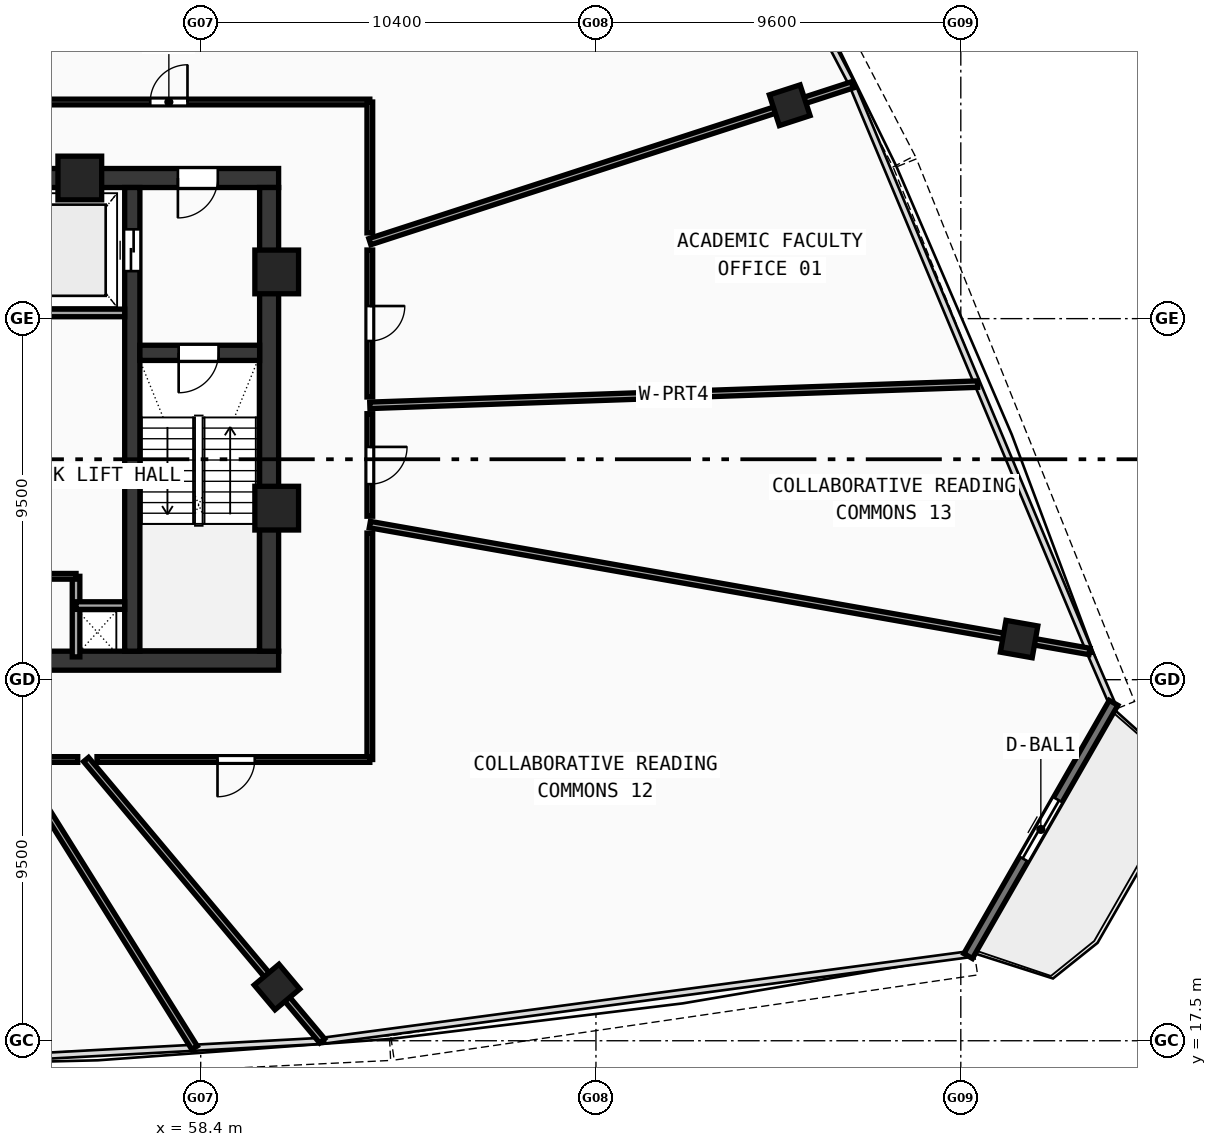
"""IFC4 building model, lengths in metres.
Left out: names, types, materials, properties, quantities, classifications, styles, units other than length and angle.
Written with IfcOpenShell. Run it as: python <this file> out.ifc"""

import sys

from ifc_helpers import new_model, si_unit, direction, frame, frame_2d, origin, origin_with_axes, origin_2d, place, context, subcontext, project, spatial, rectangle, hollow_rectangle, extrude, source, transform, mapped, element, fill, save


model = new_model("IFC4")
c1 = context("Model", 3, precision=1e-05, world=origin(), true_north=direction((0.0, 1.0)))
c2 = subcontext(c1, "Body", "Model", "MODEL_VIEW")
j1 = project(units=[si_unit("LENGTHUNIT", "METRE"), si_unit("PLANEANGLEUNIT", "RADIAN")], contexts=[c1])
p1 = place(None, origin())
s1 = spatial("IfcSite", under=j1, at=p1, CompositionType="ELEMENT")
p2 = place(p1, origin())
s2 = spatial("IfcBuilding", under=s1, at=p2, CompositionType="ELEMENT")
p3 = place(p2, frame((0.0, 0.0, 259.45)))
s3 = spatial("IfcBuildingStorey", under=s2, at=p3, CompositionType="ELEMENT", Elevation=259.45)
p4 = place(p3, frame((35.55, 27.5, 0.0), z_axis=(0.0, 0.0, 1.0), x_axis=(1.0, 0.0, 0.0)))
e1 = element("IfcWall", 1, at=p4, inside=s3, PredefinedType="SHEAR", context=c2, shape_type="SweptSolid", body=[
    extrude(rectangle(XDim=24.9, YDim=0.5, at=frame_2d((12.45, 0.0))), origin(), (0.0, 0.0, 1.0), 3.47),
])
p5 = place(p3, frame((49.2, 40.2, 0.0), z_axis=(0.0, 0.0, 1.0), x_axis=(1.0, 0.0, 0.0)))
e2 = element("IfcWall", 2, at=p5, inside=s3, PredefinedType="SHEAR", context=c2, shape_type="SweptSolid", body=[
    extrude(rectangle(XDim=11.25, YDim=0.5, at=frame_2d((5.625, 0.0))), origin(), (0.0, 0.0, 1.0), 3.47),
])
p6 = place(p5, frame((8.6, 0.0, 0.0)))
e3 = element("IfcOpeningElement", 3, at=p6, cuts=e2, PredefinedType="OPENING", context=c2, shape_type="SweptSolid", body=[
    extrude(rectangle(XDim=1.05, YDim=2.1, at=frame_2d((0.525, 1.05))), frame((0.0, 0.26, 0.0), z_axis=(0.0, -1.0, 0.0), x_axis=(1.0, 0.0, 0.0)), (0.0, 0.0, 1.0), 0.52),
])
p7 = place(p3, frame((60.2, 27.75, 0.0), z_axis=(0.0, 0.0, 1.0), x_axis=(0.0, 1.0, 0.0)))
e4 = element("IfcWall", 4, at=p7, inside=s3, PredefinedType="SHEAR", context=c2, shape_type="SweptSolid", body=[
    extrude(rectangle(XDim=12.2, YDim=0.5, at=frame_2d((6.1, 0.0))), origin(), (0.0, 0.0, 1.0), 3.47),
])
p8 = place(p3, frame((56.6, 27.75, 0.0), z_axis=(0.0, 0.0, 1.0), x_axis=(0.0, 1.0, 0.0)))
e5 = element("IfcWall", 5, at=p8, inside=s3, PredefinedType="SHEAR", context=c2, shape_type="SweptSolid", body=[
    extrude(rectangle(XDim=12.2, YDim=0.4, at=frame_2d((6.1, 0.0))), origin(), (0.0, 0.0, 1.0), 3.47),
])
p9 = place(p8, frame((10.0, 0.0, 0.0)))
e6 = element("IfcOpeningElement", 6, at=p9, cuts=e5, PredefinedType="OPENING", context=c2, shape_type="SweptSolid", body=[
    extrude(rectangle(XDim=1.1, YDim=2.1, at=frame_2d((0.55, 1.05))), frame((0.0, 0.21, 0.0), z_axis=(0.0, -1.0, 0.0), x_axis=(1.0, 0.0, 0.0)), (0.0, 0.0, 1.0), 0.42),
])
p10 = place(p3, frame((56.8, 35.6, 0.0), z_axis=(0.0, 0.0, 1.0), x_axis=(1.0, 0.0, 0.0)))
e7 = element("IfcWall", 7, at=p10, inside=s3, PredefinedType="SHEAR", context=c2, shape_type="SweptSolid", body=[
    extrude(rectangle(XDim=3.15, YDim=0.4, at=frame_2d((1.575, 0.0))), origin(), (0.0, 0.0, 1.0), 3.47),
])
p11 = place(p10, frame((1.02, 0.0, 0.0)))
e8 = element("IfcOpeningElement", 8, at=p11, cuts=e7, PredefinedType="OPENING", context=c2, shape_type="SweptSolid", body=[
    extrude(rectangle(XDim=1.05, YDim=2.1, at=frame_2d((0.525, 1.05))), frame((0.0, 0.21, 0.0), z_axis=(0.0, -1.0, 0.0), x_axis=(1.0, 0.0, 0.0)), (0.0, 0.0, 1.0), 0.42),
])
m1 = source(origin(), c2, "Body", "SweptSolid", [
    extrude(hollow_rectangle(XDim=1.15, YDim=1.15, WallThickness=0.048, at=origin_2d()), origin(), (0.0, 0.0, 1.0), 3.73),
])
for number, where, z_axis, x_axis in (
    (9, (60.4, 31.513, -0.26), (0.0, 0.0, 1.0), (1.0, 0.0, 0.0)),
    (10, (60.4, 37.729, -0.26), (0.0, 0.0, 1.0), (1.0, 0.0, 0.0)),
    (11, (55.219, 40.2, -0.26), (0.0, 0.0, 1.0), (1.0, 0.0, 0.0)),
):
    element("IfcColumn", number, at=place(p3, frame(where, z_axis=z_axis, x_axis=x_axis)), inside=s3, PredefinedType="COLUMN", context=c2, shape_type="MappedRepresentation", body=[
        mapped(m1, transform((0.0, 0.0, 0.0), scale=1.0)),
    ])
m2 = source(origin(), c2, "Body", "SweptSolid", [
    extrude(hollow_rectangle(XDim=0.85, YDim=0.85, WallThickness=0.034, at=origin_2d()), origin(), (0.0, 0.0, 1.0), 3.73),
])
for number, where, z_axis, x_axis in (
    (12, (60.407, 18.914, -0.26), (0.0, 0.0, 1.0), (0.766, 0.643, 0.0)),
    (13, (79.934, 28.069, -0.26), (0.0, 0.0, 1.0), (0.174, 0.985, 0.0)),
    (14, (73.899, 42.115, -0.26), (0.0, 0.0, 1.0), (-0.309, 0.951, 0.0)),
):
    element("IfcColumn", number, at=place(p3, frame(where, z_axis=z_axis, x_axis=x_axis)), inside=s3, PredefinedType="COLUMN", context=c2, shape_type="MappedRepresentation", body=[
        mapped(m2, transform((0.0, 0.0, 0.0), scale=1.0)),
    ])
p12 = place(p3, frame((78.593, 19.729, 0.0), z_axis=(0.0, 0.0, 1.0), x_axis=(0.497934343816, 0.867214730761, 0.0)))
e15 = element("IfcWall", 15, at=p12, inside=s3, PredefinedType="STANDARD", context=c2, shape_type="SweptSolid", body=[
    extrude(rectangle(XDim=7.684, YDim=0.26, at=frame_2d((3.842, 0.0))), origin(), (0.0, 0.0, 1.0), 3.47),
])
p13 = place(p12, frame((2.942, 0.0, 0.0)))
e16 = element("IfcOpeningElement", 16, at=p13, cuts=e15, PredefinedType="OPENING", context=c2, shape_type="SweptSolid", body=[
    extrude(rectangle(XDim=1.8, YDim=2.15, at=frame_2d((0.9, 1.075))), frame((0.0, 0.14, 0.0), z_axis=(0.0, -1.0, 0.0), x_axis=(1.0, 0.0, 0.0)), (0.0, 0.0, 1.0), 0.28),
])
p14 = place(p3, frame((53.68, 36.65, 0.0), z_axis=(0.0, 0.0, 1.0), x_axis=(1.0, 0.0, 0.0)))
e17 = element("IfcWall", 17, at=p14, inside=s3, PredefinedType="SOLIDWALL", context=c2, shape_type="SweptSolid", body=[
    extrude(rectangle(XDim=2.72, YDim=0.2, at=frame_2d((1.36, 0.0))), origin(), (0.0, 0.0, 1.0), 3.47),
])
p15 = place(p3, frame((55.12, 27.6, 0.0), z_axis=(0.0, 0.0, 1.0), x_axis=(0.0, 1.0, 0.0)))
e18 = element("IfcWall", 18, at=p15, inside=s3, PredefinedType="SOLIDWALL", context=c2, shape_type="SweptSolid", body=[
    extrude(rectangle(XDim=2.12, YDim=0.2, at=frame_2d((1.06, 0.0))), origin(), (0.0, 0.0, 1.0), 3.47),
])
p16 = place(p3, frame((55.12, 28.95, 0.0), z_axis=(0.0, 0.0, 1.0), x_axis=(1.0, 0.0, 0.0)))
e19 = element("IfcWall", 19, at=p16, inside=s3, PredefinedType="SOLIDWALL", context=c2, shape_type="SweptSolid", body=[
    extrude(rectangle(XDim=1.28, YDim=0.2, at=frame_2d((0.64, 0.0))), origin(), (0.0, 0.0, 1.0), 3.47),
])
p17 = place(p3, frame((51.05, 29.72, 0.0), z_axis=(0.0, 0.0, 1.0), x_axis=(1.0, 0.0, 0.0)))
e20 = element("IfcWall", 20, at=p17, inside=s3, PredefinedType="PARTITIONING", context=c2, shape_type="SweptSolid", body=[
    extrude(rectangle(XDim=4.07, YDim=0.15, at=frame_2d((2.035, 0.0))), origin(), (0.0, 0.0, 1.0), 3.47),
])
p18 = place(p17, frame((0.5, 0.0, 0.0)))
e21 = element("IfcOpeningElement", 21, at=p18, cuts=e20, PredefinedType="OPENING", context=c2, shape_type="SweptSolid", body=[
    extrude(rectangle(XDim=0.9, YDim=2.1, at=frame_2d((0.45, 1.05))), frame((0.0, 0.085, 0.0), z_axis=(0.0, -1.0, 0.0), x_axis=(1.0, 0.0, 0.0)), (0.0, 0.0, 1.0), 0.17),
])
p19 = place(p3, frame((62.85, 34.219, 0.0), z_axis=(0.0, 0.0, 1.0), x_axis=(0.99939049717, 0.034908941063, 0.0)))
e22 = element("IfcWall", 22, at=p19, inside=s3, PredefinedType="PARTITIONING", context=c2, shape_type="SweptSolid", body=[
    extrude(rectangle(XDim=16.001, YDim=0.17, at=frame_2d((8.001, 0.0))), origin(), (0.0, 0.0, 1.0), 2.82),
])
p20 = place(p3, frame((62.85, 38.525, 0.0), z_axis=(0.0, 0.0, 1.0), x_axis=(0.951055435747, 0.30902031994, 0.0)))
e23 = element("IfcWall", 23, at=p20, inside=s3, PredefinedType="PARTITIONING", context=c2, shape_type="SweptSolid", body=[
    extrude(rectangle(XDim=13.349, YDim=0.17, at=frame_2d((6.675, 0.0))), origin(), (0.0, 0.0, 1.0), 2.82),
])
p21 = place(p3, frame((51.784, 42.2, 0.0), z_axis=(0.0, 0.0, 1.0), x_axis=(0.406736188948, 0.913545659833, 0.0)))
e24 = element("IfcWall", 24, at=p21, inside=s3, PredefinedType="PARTITIONING", context=c2, shape_type="SweptSolid", body=[
    extrude(rectangle(XDim=25.501, YDim=0.17, at=frame_2d((12.75, 0.0))), origin(), (0.0, 0.0, 1.0), 2.82),
])
p22 = place(p3, frame((53.499, 24.9, 0.0), z_axis=(0.0, 0.0, 1.0), x_axis=(0.529920411872, -0.848047379031, 0.0)))
e25 = element("IfcWall", 25, at=p22, inside=s3, PredefinedType="PARTITIONING", context=c2, shape_type="SweptSolid", body=[
    extrude(rectangle(XDim=8.943, YDim=0.17, at=frame_2d((4.471, 0.0))), origin(), (0.0, 0.0, 1.0), 2.82),
])
p23 = place(p3, frame((55.384, 24.9, 0.0), z_axis=(0.0, 0.0, 1.0), x_axis=(0.642795010628, -0.766038232931, 0.0)))
e26 = element("IfcWall", 26, at=p23, inside=s3, PredefinedType="PARTITIONING", context=c2, shape_type="SweptSolid", body=[
    extrude(rectangle(XDim=9.663, YDim=0.17, at=frame_2d((4.832, 0.0))), origin(), (0.0, 0.0, 1.0), 2.82),
])
p24 = place(p3, frame((62.85, 31.082, 0.0), z_axis=(0.0, 0.0, 1.0), x_axis=(0.984808346381, -0.173644812474, 0.0)))
e27 = element("IfcWall", 27, at=p24, inside=s3, PredefinedType="PARTITIONING", context=c2, shape_type="SweptSolid", body=[
    extrude(rectangle(XDim=19.228, YDim=0.17, at=frame_2d((9.614, 0.0))), origin(), (0.0, 0.0, 1.0), 2.82),
])
p25 = place(p3, frame((52.025, 42.2, 0.0), z_axis=(0.0, 0.0, 1.0), x_axis=(1.0, 0.0, 0.0)))
e28 = element("IfcWall", 28, at=p25, inside=s3, PredefinedType="PARTITIONING", context=c2, shape_type="SweptSolid", body=[
    extrude(rectangle(XDim=10.825, YDim=0.15, at=frame_2d((5.413, 0.0))), origin(), (0.0, 0.0, 1.0), 2.82),
])
p26 = place(p25, frame((5.047, 0.0, 0.0)))
e29 = element("IfcOpeningElement", 29, at=p26, cuts=e28, PredefinedType="OPENING", context=c2, shape_type="SweptSolid", body=[
    extrude(rectangle(XDim=0.98, YDim=2.12, at=frame_2d((0.49, 1.06))), frame((0.0, 0.085, 0.0), z_axis=(0.0, -1.0, 0.0), x_axis=(1.0, 0.0, 0.0)), (0.0, 0.0, 1.0), 0.17),
])
p27 = place(p3, frame((62.85, 42.2, 0.0), z_axis=(0.0, 0.0, 1.0), x_axis=(0.0, -1.0, 0.0)))
e30 = element("IfcWall", 30, at=p27, inside=s3, PredefinedType="PARTITIONING", context=c2, shape_type="SweptSolid", body=[
    extrude(rectangle(XDim=3.444, YDim=0.15, at=frame_2d((1.722, 0.0))), origin(), (0.0, 0.0, 1.0), 3.12),
])
p28 = place(p3, frame((62.85, 38.305, 0.0), z_axis=(0.0, 0.0, 1.0), x_axis=(0.0, -1.0, 0.0)))
e31 = element("IfcWall", 31, at=p28, inside=s3, PredefinedType="PARTITIONING", context=c2, shape_type="SweptSolid", body=[
    extrude(rectangle(XDim=3.867, YDim=0.15, at=frame_2d((1.933, 0.0))), origin(), (0.0, 0.0, 1.0), 3.47),
])
p29 = place(p28, frame((1.473, 0.0, 0.0)))
e32 = element("IfcOpeningElement", 32, at=p29, cuts=e31, PredefinedType="OPENING", context=c2, shape_type="SweptSolid", body=[
    extrude(rectangle(XDim=0.92, YDim=2.1, at=frame_2d((0.46, 1.05))), frame((0.0, 0.085, 0.0), z_axis=(0.0, -1.0, 0.0), x_axis=(1.0, 0.0, 0.0)), (0.0, 0.0, 1.0), 0.17),
])
p30 = place(p3, frame((62.85, 33.999, 0.0), z_axis=(0.0, 0.0, 1.0), x_axis=(0.0, -1.0, 0.0)))
e33 = element("IfcWall", 33, at=p30, inside=s3, PredefinedType="PARTITIONING", context=c2, shape_type="SweptSolid", body=[
    extrude(rectangle(XDim=2.698, YDim=0.15, at=frame_2d((1.349, 0.0))), origin(), (0.0, 0.0, 1.0), 3.47),
])
p31 = place(p30, frame((0.874, 0.0, 0.0)))
e34 = element("IfcOpeningElement", 34, at=p31, cuts=e33, PredefinedType="OPENING", context=c2, shape_type="SweptSolid", body=[
    extrude(rectangle(XDim=0.98, YDim=2.12, at=frame_2d((0.49, 1.06))), frame((0.0, 0.085, 0.0), z_axis=(0.0, -1.0, 0.0), x_axis=(1.0, 0.0, 0.0)), (0.0, 0.0, 1.0), 0.17),
])
p32 = place(p3, frame((62.85, 30.858, 0.0), z_axis=(0.0, 0.0, 1.0), x_axis=(0.0, -1.0, 0.0)))
e35 = element("IfcWall", 35, at=p32, inside=s3, PredefinedType="PARTITIONING", context=c2, shape_type="SweptSolid", body=[
    extrude(rectangle(XDim=5.958, YDim=0.15, at=frame_2d((2.979, 0.0))), origin(), (0.0, 0.0, 1.0), 3.12),
])
p33 = place(p3, frame((62.85, 24.9, 0.0), z_axis=(0.0, 0.0, 1.0), x_axis=(-1.0, 0.0, 0.0)))
e36 = element("IfcWall", 36, at=p33, inside=s3, PredefinedType="PARTITIONING", context=c2, shape_type="SweptSolid", body=[
    extrude(rectangle(XDim=7.179, YDim=0.15, at=frame_2d((3.589, 0.0))), origin(), (0.0, 0.0, 1.0), 3.12),
])
p34 = place(p33, frame((3.028, 0.0, 0.0)))
e37 = element("IfcOpeningElement", 37, at=p34, cuts=e36, PredefinedType="OPENING", context=c2, shape_type="SweptSolid", body=[
    extrude(rectangle(XDim=0.98, YDim=2.12, at=frame_2d((0.49, 1.06))), frame((0.0, 0.085, 0.0), z_axis=(0.0, -1.0, 0.0), x_axis=(1.0, 0.0, 0.0)), (0.0, 0.0, 1.0), 0.17),
])
p35 = place(p3, frame((55.164, 24.9, 0.0), z_axis=(0.0, 0.0, 1.0), x_axis=(-1.0, 0.0, 0.0)))
e38 = element("IfcWall", 38, at=p35, inside=s3, PredefinedType="PARTITIONING", context=c2, shape_type="SweptSolid", body=[
    extrude(rectangle(XDim=1.406, YDim=0.15, at=frame_2d((0.703, 0.0))), origin(), (0.0, 0.0, 1.0), 2.82),
])
m3 = source(origin(), c2, "Body", "SweptSolid", [
    extrude(rectangle(XDim=1.8, YDim=2.15, at=frame_2d((0.9, 1.075))), frame((0.0, 0.025, 0.0), z_axis=(0.0, -1.0, 0.0), x_axis=(1.0, 0.0, 0.0)), (0.0, 0.0, 1.0), 0.05),
])
p36 = place(p13, origin_with_axes())
e39 = element("IfcDoor", 39, at=p36, inside=s3, OperationType="DOUBLE_DOOR_SLIDING", PredefinedType="DOOR", context=c2, shape_type="MappedRepresentation", body=[
    mapped(m3, transform((0.0, 0.0, 0.0), scale=1.0)),
])
fill(e16, e39)
m4 = source(origin(), c2, "Body", "SweptSolid", [
    extrude(rectangle(XDim=1.05, YDim=2.1, at=frame_2d((0.525, 1.05))), frame((0.0, 0.025, 0.0), z_axis=(0.0, -1.0, 0.0), x_axis=(1.0, 0.0, 0.0)), (0.0, 0.0, 1.0), 0.05),
])
p37 = place(p11, frame((1.05, 0.0, 0.0), z_axis=(0.0, 0.0, 1.0), x_axis=(-1.0, 0.0, 0.0)))
e40 = element("IfcDoor", 40, at=p37, inside=s3, OperationType="SINGLE_SWING_RIGHT", PredefinedType="DOOR", context=c2, shape_type="MappedRepresentation", body=[
    mapped(m4, transform((0.0, 0.0, 0.0), scale=1.0)),
])
fill(e8, e40)
p38 = place(p6, frame((1.05, 0.0, 0.0), z_axis=(0.0, 0.0, 1.0), x_axis=(-1.0, 0.0, 0.0)))
e41 = element("IfcDoor", 41, at=p38, inside=s3, OperationType="SINGLE_SWING_RIGHT", PredefinedType="DOOR", context=c2, shape_type="MappedRepresentation", body=[
    mapped(m4, transform((0.0, 0.0, 0.0), scale=1.0)),
])
fill(e3, e41)
m5 = source(origin(), c2, "Body", "SweptSolid", [
    extrude(rectangle(XDim=1.1, YDim=2.1, at=frame_2d((0.55, 1.05))), frame((0.0, 0.025, 0.0), z_axis=(0.0, -1.0, 0.0), x_axis=(1.0, 0.0, 0.0)), (0.0, 0.0, 1.0), 0.05),
])
p39 = place(p9, origin_with_axes())
e42 = element("IfcDoor", 42, at=p39, inside=s3, OperationType="DOUBLE_DOOR_SLIDING", PredefinedType="DOOR", context=c2, shape_type="MappedRepresentation", body=[
    mapped(m5, transform((0.0, 0.0, 0.0), scale=1.0)),
])
fill(e6, e42)
m6 = source(origin(), c2, "Body", "SweptSolid", [
    extrude(rectangle(XDim=0.92, YDim=2.1, at=frame_2d((0.46, 1.05))), frame((0.0, 0.025, 0.0), z_axis=(0.0, -1.0, 0.0), x_axis=(1.0, 0.0, 0.0)), (0.0, 0.0, 1.0), 0.05),
])
p40 = place(p29, origin_with_axes())
e43 = element("IfcDoor", 43, at=p40, inside=s3, OperationType="SINGLE_SWING_LEFT", PredefinedType="DOOR", context=c2, shape_type="MappedRepresentation", body=[
    mapped(m6, transform((0.0, 0.0, 0.0), scale=1.0)),
])
fill(e32, e43)
m7 = source(origin(), c2, "Body", "SweptSolid", [
    extrude(rectangle(XDim=0.98, YDim=2.12, at=frame_2d((0.49, 1.06))), frame((0.0, 0.025, 0.0), z_axis=(0.0, -1.0, 0.0), x_axis=(1.0, 0.0, 0.0)), (0.0, 0.0, 1.0), 0.05),
])
p41 = place(p26, origin_with_axes())
e44 = element("IfcDoor", 44, at=p41, inside=s3, OperationType="SINGLE_SWING_RIGHT", PredefinedType="DOOR", context=c2, shape_type="MappedRepresentation", body=[
    mapped(m7, transform((0.0, 0.0, 0.0), scale=1.0)),
])
fill(e29, e44)
p42 = place(p34, origin_with_axes())
e45 = element("IfcDoor", 45, at=p42, inside=s3, OperationType="SINGLE_SWING_RIGHT", PredefinedType="DOOR", context=c2, shape_type="MappedRepresentation", body=[
    mapped(m7, transform((0.0, 0.0, 0.0), scale=1.0)),
])
fill(e37, e45)
p43 = place(p31, origin_with_axes())
e46 = element("IfcDoor", 46, at=p43, inside=s3, OperationType="SINGLE_SWING_LEFT", PredefinedType="DOOR", context=c2, shape_type="MappedRepresentation", body=[
    mapped(m7, transform((0.0, 0.0, 0.0), scale=1.0)),
])
fill(e34, e46)
save(model, sys.argv[1])
